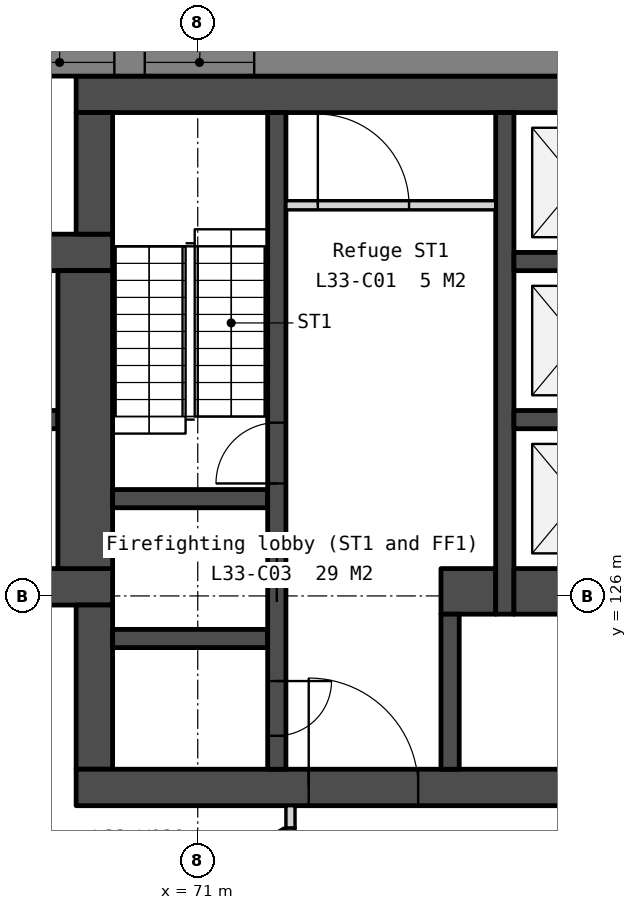
"""IFC4 building model, lengths in metres.
Left out: names, types, materials, properties, quantities, classifications, styles, units other than length and angle.
Written with IfcOpenShell. Run it as: python <this file> out.ifc"""

import sys

from ifc_helpers import new_model, si_unit, direction, frame, frame_2d, origin, place, context, subcontext, project, spatial, polyline, rectangle, outline, extrude, element, fill, save


model = new_model("IFC4")
c1 = context("Model", 3, precision=1e-05, world=origin(), true_north=direction((0.0, 1.0)))
c2 = subcontext(c1, "Body", "Model", "MODEL_VIEW")
j1 = project(units=[si_unit("LENGTHUNIT", "METRE"), si_unit("PLANEANGLEUNIT", "RADIAN")], contexts=[c1])
p1 = place(None, origin())
s1 = spatial("IfcSite", under=j1, at=p1, CompositionType="ELEMENT")
p2 = place(p1, origin())
s2 = spatial("IfcBuilding", under=s1, at=p2, CompositionType="ELEMENT")
p3 = place(p2, frame((0.0, 0.0, 132.5)))
s3 = spatial("IfcBuildingStorey", under=s2, at=p3, CompositionType="ELEMENT", Elevation=132.5)
for number, where, z_axis, x_axis in (
    (1, (66.0, 131.65, 0.0), (0.0, 0.0, 1.0), (1.0, 0.0, 0.0)),
    (2, (66.0, 126.15, 0.0), (0.0, 0.0, 1.0), (1.0, 0.0, 0.0)),
):
    element("IfcWall", number, at=place(p3, frame(where, z_axis=z_axis, x_axis=x_axis)), inside=s3, PredefinedType="SOLIDWALL", context=c2, shape_type="SweptSolid", body=[
        extrude(rectangle(XDim=3.6, YDim=0.6, at=frame_2d((1.8, 0.0))), origin(), (0.0, 0.0, 1.0), 3.75),
    ])
p4 = place(p3, frame((66.6, 128.9, 0.0), z_axis=(0.0, 0.0, 1.0), x_axis=(1.0, 0.0, 0.0)))
e3 = element("IfcWall", 3, at=p4, inside=s3, PredefinedType="SOLIDWALL", context=c2, shape_type="SweptSolid", body=[
    extrude(rectangle(XDim=2.1, YDim=0.3, at=frame_2d((1.05, 0.0))), origin(), (0.0, 0.0, 1.0), 3.75),
])
p5 = place(p3, frame((69.15, 131.35, 0.0), z_axis=(0.0, 0.0, 1.0), x_axis=(0.0, -1.0, 0.0)))
e4 = element("IfcWall", 4, at=p5, inside=s3, PredefinedType="SOLIDWALL", context=c2, shape_type="SweptSolid", body=[
    extrude(rectangle(XDim=4.9, YDim=0.9, at=frame_2d((2.45, 0.0))), origin(), (0.0, 0.0, 1.0), 3.75),
])
p6 = place(p3, frame((69.0, 134.25, 0.0), z_axis=(0.0, 0.0, 1.0), x_axis=(1.0, 0.0, 0.0)))
e5 = element("IfcWall", 5, at=p6, inside=s3, PredefinedType="SOLIDWALL", context=c2, shape_type="SweptSolid", body=[
    extrude(rectangle(XDim=22.0, YDim=0.6, at=frame_2d((11.0, 0.0))), origin(), (0.0, 0.0, 1.0), 3.75),
])
p7 = place(p3, frame((69.3, 133.95, 0.0), z_axis=(0.0, 0.0, 1.0), x_axis=(0.0, -1.0, 0.0)))
e6 = element("IfcWall", 6, at=p7, inside=s3, PredefinedType="SOLIDWALL", context=c2, shape_type="SweptSolid", body=[
    extrude(rectangle(XDim=2.0, YDim=0.6, at=frame_2d((1.0, 0.0))), origin(), (0.0, 0.0, 1.0), 3.75),
])
p8 = place(p3, frame((69.3, 125.85, 0.0), z_axis=(0.0, 0.0, 1.0), x_axis=(0.0, -1.0, 0.0)))
e7 = element("IfcWall", 7, at=p8, inside=s3, PredefinedType="SOLIDWALL", context=c2, shape_type="SweptSolid", body=[
    extrude(rectangle(XDim=2.7, YDim=0.6, at=frame_2d((1.35, 0.0))), origin(), (0.0, 0.0, 1.0), 3.75),
])
p9 = place(p3, frame((69.0, 122.85, 0.0), z_axis=(0.0, 0.0, 1.0), x_axis=(1.0, 0.0, 0.0)))
e8 = element("IfcWall", 8, at=p9, inside=s3, PredefinedType="SOLIDWALL", context=c2, shape_type="SweptSolid", body=[
    extrude(rectangle(XDim=22.0, YDim=0.6, at=frame_2d((11.0, 0.0))), origin(), (0.0, 0.0, 1.0), 3.75),
])
p10 = place(p9, frame((16.375, 0.0, 0.0)))
e9 = element("IfcOpeningElement", 9, at=p10, cuts=e8, PredefinedType="OPENING", context=c2, shape_type="SweptSolid", body=[
    extrude(rectangle(XDim=1.8, YDim=2.1, at=frame_2d((0.9, 1.05))), frame((0.0, 0.31, 0.0), z_axis=(0.0, -1.0, 0.0), x_axis=(1.0, 0.0, 0.0)), (0.0, 0.0, 1.0), 0.62),
])
p11 = place(p9, frame((3.825, 0.0, 0.0)))
e10 = element("IfcOpeningElement", 10, at=p11, cuts=e8, PredefinedType="OPENING", context=c2, shape_type="SweptSolid", body=[
    extrude(rectangle(XDim=1.8, YDim=2.1, at=frame_2d((0.9, 1.05))), frame((0.0, 0.31, 0.0), z_axis=(0.0, -1.0, 0.0), x_axis=(1.0, 0.0, 0.0)), (0.0, 0.0, 1.0), 0.62),
])
p12 = place(p9, frame((12.85, 0.0, 0.0)))
e11 = element("IfcOpeningElement", 11, at=p12, cuts=e8, PredefinedType="OPENING", context=c2, shape_type="SweptSolid", body=[
    extrude(rectangle(XDim=1.5, YDim=2.1, at=frame_2d((0.75, 1.05))), frame((0.0, 0.31, 0.0), z_axis=(0.0, -1.0, 0.0), x_axis=(1.0, 0.0, 0.0)), (0.0, 0.0, 1.0), 0.62),
])
for number, where, z_axis, x_axis in (
    (12, (69.6, 127.6, 0.0), (0.0, 0.0, 1.0), (1.0, 0.0, 0.0)),
    (13, (69.6, 125.3, 0.0), (0.0, 0.0, 1.0), (1.0, 0.0, 0.0)),
):
    element("IfcWall", number, at=place(p3, frame(where, z_axis=z_axis, x_axis=x_axis)), inside=s3, PredefinedType="SOLIDWALL", context=c2, shape_type="SweptSolid", body=[
        extrude(rectangle(XDim=2.55, YDim=0.3, at=frame_2d((1.275, 0.0))), origin(), (0.0, 0.0, 1.0), 3.75),
    ])
p13 = place(p3, frame((72.3, 133.95, 0.0), z_axis=(0.0, 0.0, 1.0), x_axis=(0.0, -1.0, 0.0)))
e14 = element("IfcWall", 14, at=p13, inside=s3, PredefinedType="SOLIDWALL", context=c2, shape_type="SweptSolid", body=[
    extrude(rectangle(XDim=10.8, YDim=0.3, at=frame_2d((5.4, 0.0))), origin(), (0.0, 0.0, 1.0), 3.75),
])
p14 = place(p13, frame((6.95, 0.0, 0.0)))
e15 = element("IfcOpeningElement", 15, at=p14, cuts=e14, PredefinedType="OPENING", context=c2, shape_type="SweptSolid", body=[
    extrude(rectangle(XDim=1.1, YDim=2.1, at=frame_2d((0.55, 1.05))), frame((0.0, 0.16, 0.0), z_axis=(0.0, -1.0, 0.0), x_axis=(1.0, 0.0, 0.0)), (0.0, 0.0, 1.0), 0.32),
])
p15 = place(p13, frame((9.35, 0.0, 0.0)))
e16 = element("IfcOpeningElement", 16, at=p15, cuts=e14, PredefinedType="OPENING", context=c2, shape_type="SweptSolid", body=[
    extrude(rectangle(XDim=0.9, YDim=2.1, at=frame_2d((0.45, 1.05))), frame((0.0, 0.16, 0.0), z_axis=(0.0, -1.0, 0.0), x_axis=(1.0, 0.0, 0.0)), (0.0, 0.0, 1.0), 0.32),
])
p16 = place(p13, frame((5.1, 0.0, 0.0)))
e17 = element("IfcOpeningElement", 17, at=p16, cuts=e14, PredefinedType="OPENING", context=c2, shape_type="SweptSolid", body=[
    extrude(rectangle(XDim=1.0, YDim=2.1, at=frame_2d((0.5, 1.05))), frame((0.0, 0.16, 0.0), z_axis=(0.0, -1.0, 0.0), x_axis=(1.0, 0.0, 0.0)), (0.0, 0.0, 1.0), 0.32),
])
p17 = place(p3, frame((72.45, 132.425, 0.0), z_axis=(0.0, 0.0, 1.0), x_axis=(1.0, 0.0, 0.0)))
e18 = element("IfcWall", 18, at=p17, inside=s3, PredefinedType="PARTITIONING", context=c2, shape_type="SweptSolid", body=[
    extrude(rectangle(XDim=3.45, YDim=0.15, at=frame_2d((1.725, 0.0))), origin(), (0.0, 0.0, 1.0), 3.75),
])
p18 = place(p17, frame((0.525, 0.0, 0.0)))
e19 = element("IfcOpeningElement", 19, at=p18, cuts=e18, PredefinedType="OPENING", context=c2, shape_type="SweptSolid", body=[
    extrude(rectangle(XDim=1.5, YDim=2.1, at=frame_2d((0.75, 1.05))), frame((0.0, 0.085, 0.0), z_axis=(0.0, -1.0, 0.0), x_axis=(1.0, 0.0, 0.0)), (0.0, 0.0, 1.0), 0.17),
])
p19 = place(p3, frame((75.0, 126.075, 0.0), z_axis=(0.0, 0.0, 1.0), x_axis=(1.0, 0.0, 0.0)))
e20 = element("IfcWall", 20, at=p19, inside=s3, PredefinedType="SOLIDWALL", context=c2, shape_type="SweptSolid", body=[
    extrude(rectangle(XDim=0.9, YDim=0.75, at=frame_2d((0.45, 0.0))), origin(), (0.0, 0.0, 1.0), 3.75),
])
p20 = place(p3, frame((75.15, 125.7, 0.0), z_axis=(0.0, 0.0, 1.0), x_axis=(0.0, -1.0, 0.0)))
e21 = element("IfcWall", 21, at=p20, inside=s3, PredefinedType="SOLIDWALL", context=c2, shape_type="SweptSolid", body=[
    extrude(rectangle(XDim=2.55, YDim=0.3, at=frame_2d((1.275, 0.0))), origin(), (0.0, 0.0, 1.0), 3.75),
])
p21 = place(p3, frame((76.05, 133.95, 0.0), z_axis=(0.0, 0.0, 1.0), x_axis=(0.0, -1.0, 0.0)))
e22 = element("IfcWall", 22, at=p21, inside=s3, PredefinedType="SOLIDWALL", context=c2, shape_type="SweptSolid", body=[
    extrude(rectangle(XDim=8.25, YDim=0.3, at=frame_2d((4.125, 0.0))), origin(), (0.0, 0.0, 1.0), 3.75),
])
for number, where, z_axis, x_axis in (
    (23, (76.2, 131.5, 0.0), (0.0, 0.0, 1.0), (1.0, 0.0, 0.0)),
    (24, (76.2, 128.9, 0.0), (0.0, 0.0, 1.0), (1.0, 0.0, 0.0)),
):
    element("IfcWall", number, at=place(p3, frame(where, z_axis=z_axis, x_axis=x_axis)), inside=s3, PredefinedType="SOLIDWALL", context=c2, shape_type="SweptSolid", body=[
        extrude(rectangle(XDim=2.1, YDim=0.3, at=frame_2d((1.05, 0.0))), origin(), (0.0, 0.0, 1.0), 3.75),
    ])
p22 = place(p3, frame((76.2, 126.075, 0.0), z_axis=(0.0, 0.0, 1.0), x_axis=(1.0, 0.0, 0.0)))
e25 = element("IfcWall", 25, at=p22, inside=s3, PredefinedType="SOLIDWALL", context=c2, shape_type="SweptSolid", body=[
    extrude(rectangle(XDim=2.1, YDim=0.75, at=frame_2d((1.05, 0.0))), origin(), (0.0, 0.0, 1.0), 3.75),
])
p23 = place(p3, frame((100.243, 134.775, -0.15), z_axis=(0.0, 0.0, 1.0), x_axis=(-1.0, 0.0, 0.0)))
e26 = element("IfcWall", 26, at=p23, inside=s3, PredefinedType="SOLIDWALL", context=c2, shape_type="SweptSolid", body=[
    extrude(outline(polyline([(40.486, 0.0), (40.486, 3.9), (0.0, 3.9), (0.0, 0.0), (40.486, 0.0)])), frame((0.0, 0.225, 0.0), z_axis=(0.0, -1.0, 0.0), x_axis=(1.0, 0.0, 0.0)), (0.0, 0.0, 1.0), 0.45),
])
p24 = place(p23, frame((0.837, 0.0, 0.95)))
e27 = element("IfcOpeningElement", 27, at=p24, cuts=e26, PredefinedType="OPENING", context=c2, shape_type="SweptSolid", body=[
    extrude(rectangle(XDim=1.2, YDim=2.2, at=frame_2d((0.6, 1.1))), frame((0.0, 0.235, 0.0), z_axis=(0.0, -1.0, 0.0), x_axis=(1.0, 0.0, 0.0)), (0.0, 0.0, 1.0), 0.47),
])
p25 = place(p23, frame((8.072, 0.0, 0.95)))
e28 = element("IfcOpeningElement", 28, at=p25, cuts=e26, PredefinedType="OPENING", context=c2, shape_type="SweptSolid", body=[
    extrude(rectangle(XDim=1.8, YDim=2.2, at=frame_2d((0.9, 1.1))), frame((0.0, 0.235, 0.0), z_axis=(0.0, -1.0, 0.0), x_axis=(1.0, 0.0, 0.0)), (0.0, 0.0, 1.0), 0.47),
])
p26 = place(p23, frame((10.372, 0.0, 0.95)))
e29 = element("IfcOpeningElement", 29, at=p26, cuts=e26, PredefinedType="OPENING", context=c2, shape_type="SweptSolid", body=[
    extrude(rectangle(XDim=1.8, YDim=2.2, at=frame_2d((0.9, 1.1))), frame((0.0, 0.235, 0.0), z_axis=(0.0, -1.0, 0.0), x_axis=(1.0, 0.0, 0.0)), (0.0, 0.0, 1.0), 0.47),
])
p27 = place(p23, frame((18.193, 0.0, 0.95)))
e30 = element("IfcOpeningElement", 30, at=p27, cuts=e26, PredefinedType="OPENING", context=c2, shape_type="SweptSolid", body=[
    extrude(rectangle(XDim=1.8, YDim=2.2, at=frame_2d((0.9, 1.1))), frame((0.0, 0.235, 0.0), z_axis=(0.0, -1.0, 0.0), x_axis=(1.0, 0.0, 0.0)), (0.0, 0.0, 1.0), 0.47),
])
p28 = place(p23, frame((20.493, 0.0, 0.95)))
e31 = element("IfcOpeningElement", 31, at=p28, cuts=e26, PredefinedType="OPENING", context=c2, shape_type="SweptSolid", body=[
    extrude(rectangle(XDim=1.8, YDim=2.2, at=frame_2d((0.9, 1.1))), frame((0.0, 0.235, 0.0), z_axis=(0.0, -1.0, 0.0), x_axis=(1.0, 0.0, 0.0)), (0.0, 0.0, 1.0), 0.47),
])
p29 = place(p23, frame((28.315, 0.0, 0.95)))
e32 = element("IfcOpeningElement", 32, at=p29, cuts=e26, PredefinedType="OPENING", context=c2, shape_type="SweptSolid", body=[
    extrude(rectangle(XDim=1.8, YDim=2.2, at=frame_2d((0.9, 1.1))), frame((0.0, 0.235, 0.0), z_axis=(0.0, -1.0, 0.0), x_axis=(1.0, 0.0, 0.0)), (0.0, 0.0, 1.0), 0.47),
])
p30 = place(p23, frame((30.615, 0.0, 0.95)))
e33 = element("IfcOpeningElement", 33, at=p30, cuts=e26, PredefinedType="OPENING", context=c2, shape_type="SweptSolid", body=[
    extrude(rectangle(XDim=1.8, YDim=2.2, at=frame_2d((0.9, 1.1))), frame((0.0, 0.235, 0.0), z_axis=(0.0, -1.0, 0.0), x_axis=(1.0, 0.0, 0.0)), (0.0, 0.0, 1.0), 0.47),
])
p31 = place(p23, frame((38.449, 0.0, 0.95)))
e34 = element("IfcOpeningElement", 34, at=p31, cuts=e26, PredefinedType="OPENING", context=c2, shape_type="SweptSolid", body=[
    extrude(rectangle(XDim=1.2, YDim=2.2, at=frame_2d((0.6, 1.1))), frame((0.0, 0.235, 0.0), z_axis=(0.0, -1.0, 0.0), x_axis=(1.0, 0.0, 0.0)), (0.0, 0.0, 1.0), 0.47),
])
p32 = place(p3, frame((57.652, 131.129, -0.15), z_axis=(0.0, 0.0, 1.0), x_axis=(0.499997369791, -0.866026922331, 0.0)))
e35 = element("IfcWall", 35, at=p32, inside=s3, PredefinedType="SOLIDWALL", context=c2, shape_type="SweptSolid", body=[
    extrude(outline(polyline([(40.486, 0.0), (40.486, 3.9), (0.0, 3.9), (0.0, 0.0), (40.486, 0.0)])), frame((0.0, 0.225, 0.0), z_axis=(0.0, -1.0, 0.0), x_axis=(1.0, 0.0, 0.0)), (0.0, 0.0, 1.0), 0.45),
])
p33 = place(p32, frame((0.837, 0.0, 0.95)))
e36 = element("IfcOpeningElement", 36, at=p33, cuts=e35, PredefinedType="OPENING", context=c2, shape_type="SweptSolid", body=[
    extrude(rectangle(XDim=1.2, YDim=2.2, at=frame_2d((0.6, 1.1))), frame((0.0, 0.235, 0.0), z_axis=(0.0, -1.0, 0.0), x_axis=(1.0, 0.0, 0.0)), (0.0, 0.0, 1.0), 0.47),
])
p34 = place(p32, frame((8.072, 0.0, 0.95)))
e37 = element("IfcOpeningElement", 37, at=p34, cuts=e35, PredefinedType="OPENING", context=c2, shape_type="SweptSolid", body=[
    extrude(rectangle(XDim=1.8, YDim=2.2, at=frame_2d((0.9, 1.1))), frame((0.0, 0.235, 0.0), z_axis=(0.0, -1.0, 0.0), x_axis=(1.0, 0.0, 0.0)), (0.0, 0.0, 1.0), 0.47),
])
p35 = place(p32, frame((10.372, 0.0, 0.95)))
e38 = element("IfcOpeningElement", 38, at=p35, cuts=e35, PredefinedType="OPENING", context=c2, shape_type="SweptSolid", body=[
    extrude(rectangle(XDim=1.8, YDim=2.2, at=frame_2d((0.9, 1.1))), frame((0.0, 0.235, 0.0), z_axis=(0.0, -1.0, 0.0), x_axis=(1.0, 0.0, 0.0)), (0.0, 0.0, 1.0), 0.47),
])
p36 = place(p32, frame((18.193, 0.0, 0.95)))
e39 = element("IfcOpeningElement", 39, at=p36, cuts=e35, PredefinedType="OPENING", context=c2, shape_type="SweptSolid", body=[
    extrude(rectangle(XDim=1.8, YDim=2.2, at=frame_2d((0.9, 1.1))), frame((0.0, 0.235, 0.0), z_axis=(0.0, -1.0, 0.0), x_axis=(1.0, 0.0, 0.0)), (0.0, 0.0, 1.0), 0.47),
])
p37 = place(p32, frame((20.493, 0.0, 0.95)))
e40 = element("IfcOpeningElement", 40, at=p37, cuts=e35, PredefinedType="OPENING", context=c2, shape_type="SweptSolid", body=[
    extrude(rectangle(XDim=1.8, YDim=2.2, at=frame_2d((0.9, 1.1))), frame((0.0, 0.235, 0.0), z_axis=(0.0, -1.0, 0.0), x_axis=(1.0, 0.0, 0.0)), (0.0, 0.0, 1.0), 0.47),
])
p38 = place(p32, frame((28.315, 0.0, 0.95)))
e41 = element("IfcOpeningElement", 41, at=p38, cuts=e35, PredefinedType="OPENING", context=c2, shape_type="SweptSolid", body=[
    extrude(rectangle(XDim=1.8, YDim=2.2, at=frame_2d((0.9, 1.1))), frame((0.0, 0.235, 0.0), z_axis=(0.0, -1.0, 0.0), x_axis=(1.0, 0.0, 0.0)), (0.0, 0.0, 1.0), 0.47),
])
p39 = place(p32, frame((30.615, 0.0, 0.95)))
e42 = element("IfcOpeningElement", 42, at=p39, cuts=e35, PredefinedType="OPENING", context=c2, shape_type="SweptSolid", body=[
    extrude(rectangle(XDim=1.8, YDim=2.2, at=frame_2d((0.9, 1.1))), frame((0.0, 0.235, 0.0), z_axis=(0.0, -1.0, 0.0), x_axis=(1.0, 0.0, 0.0)), (0.0, 0.0, 1.0), 0.47),
])
p40 = place(p32, frame((38.449, 0.0, 0.95)))
e43 = element("IfcOpeningElement", 43, at=p40, cuts=e35, PredefinedType="OPENING", context=c2, shape_type="SweptSolid", body=[
    extrude(rectangle(XDim=1.2, YDim=2.2, at=frame_2d((0.6, 1.1))), frame((0.0, 0.235, 0.0), z_axis=(0.0, -1.0, 0.0), x_axis=(1.0, 0.0, 0.0)), (0.0, 0.0, 1.0), 0.47),
])
p41 = place(p3, frame((65.438, 118.093, 0.0), z_axis=(0.0, 0.0, 1.0), x_axis=(0.866029768103, 0.499992440702, 0.0)))
e44 = element("IfcWall", 44, at=p41, inside=s3, PredefinedType="PARTITIONING", context=c2, shape_type="SweptSolid", body=[
    extrude(rectangle(XDim=8.089, YDim=0.1, at=frame_2d((4.044, 0.0))), origin(), (0.0, 0.0, 1.0), 3.75),
])
p42 = place(p41, frame((3.594, 0.0, 0.0)))
e45 = element("IfcOpeningElement", 45, at=p42, cuts=e44, PredefinedType="OPENING", context=c2, shape_type="SweptSolid", body=[
    extrude(rectangle(XDim=0.9, YDim=2.1, at=frame_2d((0.45, 1.05))), frame((0.0, 0.06, 0.0), z_axis=(0.0, -1.0, 0.0), x_axis=(1.0, 0.0, 0.0)), (0.0, 0.0, 1.0), 0.12),
])
p43 = place(p3, frame((72.525, 120.05, 0.0), z_axis=(0.0, 0.0, 1.0), x_axis=(0.0, 1.0, 0.0)))
e46 = element("IfcWall", 46, at=p43, inside=s3, PredefinedType="PARTITIONING", context=c2, shape_type="SweptSolid", body=[
    extrude(rectangle(XDim=2.135, YDim=0.15, at=frame_2d((1.067, 0.0))), origin(), (0.0, 0.0, 1.0), 3.75),
])
p44 = place(p43, frame((0.567, 0.0, 0.0)))
e47 = element("IfcOpeningElement", 47, at=p44, cuts=e46, PredefinedType="OPENING", context=c2, shape_type="SweptSolid", body=[
    extrude(rectangle(XDim=1.0, YDim=2.1, at=frame_2d((0.5, 1.05))), frame((0.0, 0.085, 0.0), z_axis=(0.0, -1.0, 0.0), x_axis=(1.0, 0.0, 0.0)), (0.0, 0.0, 1.0), 0.17),
])
p45 = place(p3, frame((72.525, 122.185, 0.0), z_axis=(0.0, 0.0, 1.0), x_axis=(0.0, 1.0, 0.0)))
e48 = element("IfcWall", 48, at=p45, inside=s3, PredefinedType="PARTITIONING", context=c2, shape_type="SweptSolid", body=[
    extrude(rectangle(XDim=0.365, YDim=0.15, at=frame_2d((0.183, 0.0))), origin(), (0.0, 0.0, 1.0), 3.75),
])
p46 = place(p14, origin())
e49 = element("IfcDoor", 49, at=p46, inside=s3, OperationType="SLIDING_TO_LEFT", PredefinedType="DOOR", context=c2, shape_type="SweptSolid", body=[
    extrude(rectangle(XDim=1.1, YDim=2.1, at=frame_2d((0.55, 1.05))), frame((0.0, 0.025, 0.0), z_axis=(0.0, -1.0, 0.0), x_axis=(1.0, 0.0, 0.0)), (0.0, 0.0, 1.0), 0.05),
])
fill(e15, e49)
p47 = place(p11, origin())
e50 = element("IfcDoor", 50, at=p47, inside=s3, OperationType="DOUBLE_DOOR_DOUBLE_SWING", PredefinedType="DOOR", context=c2, shape_type="SweptSolid", body=[
    extrude(rectangle(XDim=1.8, YDim=2.1, at=frame_2d((0.9, 1.05))), frame((0.0, 0.025, 0.0), z_axis=(0.0, -1.0, 0.0), x_axis=(1.0, 0.0, 0.0)), (0.0, 0.0, 1.0), 0.05),
])
fill(e10, e50)
p48 = place(p18, origin())
e51 = element("IfcDoor", 51, at=p48, inside=s3, OperationType="DOUBLE_DOOR_DOUBLE_SWING", PredefinedType="DOOR", context=c2, shape_type="SweptSolid", body=[
    extrude(rectangle(XDim=1.5, YDim=2.1, at=frame_2d((0.75, 1.05))), frame((0.0, 0.025, 0.0), z_axis=(0.0, -1.0, 0.0), x_axis=(1.0, 0.0, 0.0)), (0.0, 0.0, 1.0), 0.05),
])
fill(e19, e51)
p49 = place(p15, origin())
e52 = element("IfcDoor", 52, at=p49, inside=s3, OperationType="SINGLE_SWING_LEFT", PredefinedType="DOOR", context=c2, shape_type="SweptSolid", body=[
    extrude(rectangle(XDim=0.9, YDim=2.1, at=frame_2d((0.45, 1.05))), frame((0.0, 0.025, 0.0), z_axis=(0.0, -1.0, 0.0), x_axis=(1.0, 0.0, 0.0)), (0.0, 0.0, 1.0), 0.05),
])
fill(e16, e52)
p50 = place(p16, origin())
e53 = element("IfcDoor", 53, at=p50, inside=s3, OperationType="SINGLE_SWING_RIGHT", PredefinedType="DOOR", context=c2, shape_type="SweptSolid", body=[
    extrude(rectangle(XDim=1.0, YDim=2.1, at=frame_2d((0.5, 1.05))), frame((0.0, 0.025, 0.0), z_axis=(0.0, -1.0, 0.0), x_axis=(1.0, 0.0, 0.0)), (0.0, 0.0, 1.0), 0.05),
])
fill(e17, e53)
p51 = place(p29, origin())
e54 = element("IfcWindow", 54, at=p51, inside=s3, PartitioningType="SINGLE_PANEL", PredefinedType="WINDOW", context=c2, shape_type="SweptSolid", body=[
    extrude(rectangle(XDim=1.8, YDim=2.2, at=frame_2d((0.9, 1.1))), frame((0.0, 0.03, 0.0), z_axis=(0.0, -1.0, 0.0), x_axis=(1.0, 0.0, 0.0)), (0.0, 0.0, 1.0), 0.06),
])
fill(e32, e54)
p52 = place(p30, origin())
e55 = element("IfcWindow", 55, at=p52, inside=s3, PartitioningType="SINGLE_PANEL", PredefinedType="WINDOW", context=c2, shape_type="SweptSolid", body=[
    extrude(rectangle(XDim=1.8, YDim=2.2, at=frame_2d((0.9, 1.1))), frame((0.0, 0.03, 0.0), z_axis=(0.0, -1.0, 0.0), x_axis=(1.0, 0.0, 0.0)), (0.0, 0.0, 1.0), 0.06),
])
fill(e33, e55)
save(model, sys.argv[1])
